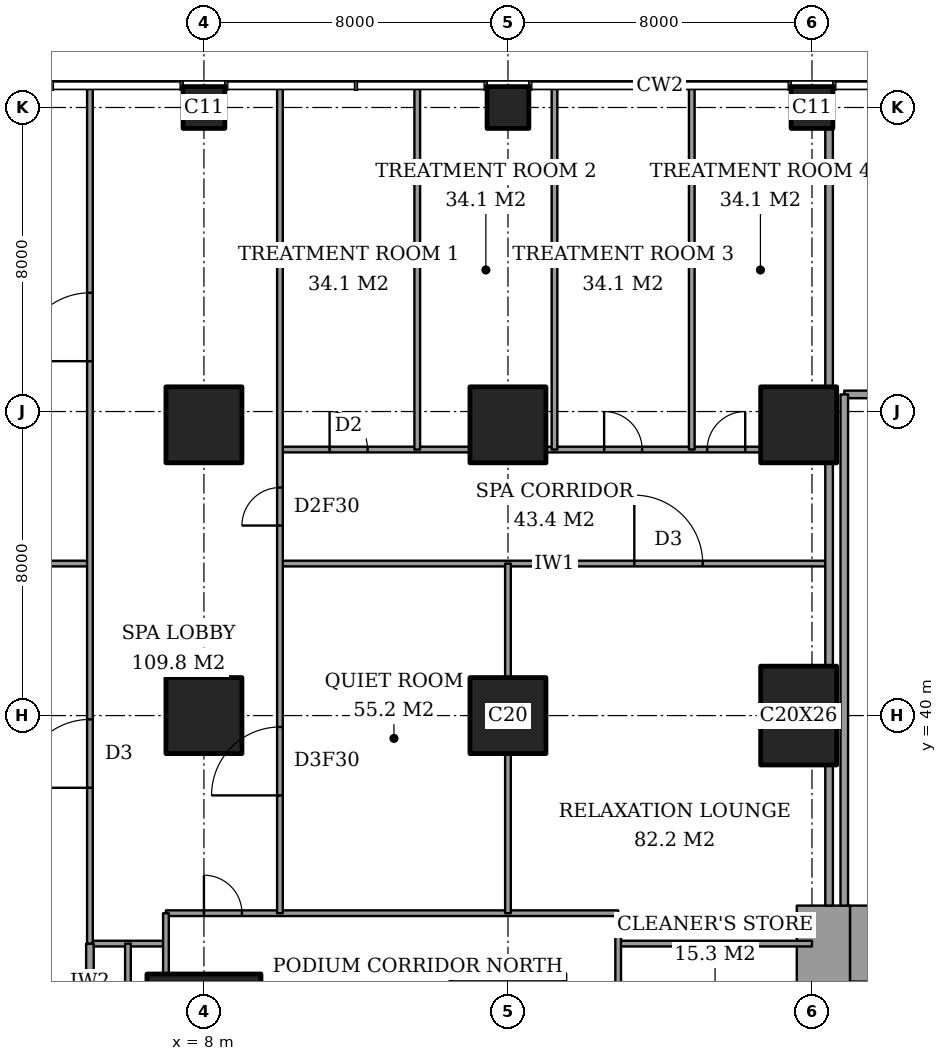
"""IFC4 building model, lengths in metres.
Left out: names, types, materials, properties, quantities, classifications, styles, units other than length and angle.
Written with IfcOpenShell. Run it as: python <this file> out.ifc"""

import sys

from ifc_helpers import new_model, si_unit, direction, frame, frame_2d, origin, origin_2d, place, context, subcontext, project, spatial, rectangle, extrude, element, fill, save


model = new_model("IFC4")
c1 = context("Model", 3, precision=1e-05, world=origin(), true_north=direction((0.0, 1.0)))
c2 = subcontext(c1, "Body", "Model", "MODEL_VIEW")
j1 = project(units=[si_unit("LENGTHUNIT", "METRE"), si_unit("PLANEANGLEUNIT", "RADIAN")], contexts=[c1])
p1 = place(None, origin())
s1 = spatial("IfcSite", under=j1, at=p1, CompositionType="ELEMENT")
p2 = place(p1, origin())
s2 = spatial("IfcBuilding", under=s1, at=p2, CompositionType="ELEMENT")
p3 = place(p2, frame((0.0, 0.0, 11.0)))
s3 = spatial("IfcBuildingStorey", under=s2, at=p3, CompositionType="ELEMENT", Elevation=11.0)
p4 = place(p3, frame((8.0, 32.0, 0.0), z_axis=(0.0, 0.0, 1.0), x_axis=(1.0, 0.0, 0.0)))
e1 = element("IfcColumn", 1, at=p4, inside=s3, PredefinedType="COLUMN", context=c2, shape_type="SweptSolid", body=[
    extrude(rectangle(XDim=3.0, YDim=2.4, at=origin_2d()), origin(), (0.0, 0.0, 1.0), 5.0),
])
for number, where, z_axis, x_axis in (
    (2, (8.0, 40.0, 0.0), (0.0, 0.0, 1.0), (1.0, 0.0, 0.0)),
    (3, (8.0, 47.65, 0.0), (0.0, 0.0, 1.0), (1.0, 0.0, 0.0)),
):
    element("IfcColumn", number, at=place(p3, frame(where, z_axis=z_axis, x_axis=x_axis)), inside=s3, PredefinedType="COLUMN", context=c2, shape_type="SweptSolid", body=[
        extrude(rectangle(XDim=2.0, YDim=2.0, at=origin_2d()), origin(), (0.0, 0.0, 1.0), 5.0),
    ])
p5 = place(p3, frame((8.0, 56.0, 0.0), z_axis=(0.0, 0.0, 1.0), x_axis=(1.0, 0.0, 0.0)))
e4 = element("IfcColumn", 4, at=p5, inside=s3, PredefinedType="COLUMN", context=c2, shape_type="SweptSolid", body=[
    extrude(rectangle(XDim=1.1, YDim=1.1, at=origin_2d()), origin(), (0.0, 0.0, 1.0), 5.0),
])
p6 = place(p3, frame((16.0, 32.0, 0.0), z_axis=(0.0, 0.0, 1.0), x_axis=(1.0, 0.0, 0.0)))
e5 = element("IfcColumn", 5, at=p6, inside=s3, PredefinedType="COLUMN", context=c2, shape_type="SweptSolid", body=[
    extrude(rectangle(XDim=3.0, YDim=2.4, at=origin_2d()), origin(), (0.0, 0.0, 1.0), 5.0),
])
for number, where, z_axis, x_axis in (
    (6, (16.0, 40.0, 0.0), (0.0, 0.0, 1.0), (1.0, 0.0, 0.0)),
    (7, (16.0, 47.65, 0.0), (0.0, 0.0, 1.0), (1.0, 0.0, 0.0)),
):
    element("IfcColumn", number, at=place(p3, frame(where, z_axis=z_axis, x_axis=x_axis)), inside=s3, PredefinedType="COLUMN", context=c2, shape_type="SweptSolid", body=[
        extrude(rectangle(XDim=2.0, YDim=2.0, at=origin_2d()), origin(), (0.0, 0.0, 1.0), 5.0),
    ])
p7 = place(p3, frame((16.0, 56.0, 0.0), z_axis=(0.0, 0.0, 1.0), x_axis=(1.0, 0.0, 0.0)))
e8 = element("IfcColumn", 8, at=p7, inside=s3, PredefinedType="COLUMN", context=c2, shape_type="SweptSolid", body=[
    extrude(rectangle(XDim=1.1, YDim=1.1, at=origin_2d()), origin(), (0.0, 0.0, 1.0), 5.0),
])
p8 = place(p3, frame((23.65, 40.0, 0.0), z_axis=(0.0, 0.0, 1.0), x_axis=(1.0, 0.0, 0.0)))
e9 = element("IfcColumn", 9, at=p8, inside=s3, PredefinedType="COLUMN", context=c2, shape_type="SweptSolid", body=[
    extrude(rectangle(XDim=2.0, YDim=2.6, at=origin_2d()), origin(), (0.0, 0.0, 1.0), 5.0),
])
p9 = place(p3, frame((23.65, 47.65, 0.0), z_axis=(0.0, 0.0, 1.0), x_axis=(1.0, 0.0, 0.0)))
e10 = element("IfcColumn", 10, at=p9, inside=s3, PredefinedType="COLUMN", context=c2, shape_type="SweptSolid", body=[
    extrude(rectangle(XDim=2.0, YDim=2.0, at=origin_2d()), origin(), (0.0, 0.0, 1.0), 5.0),
])
p10 = place(p3, frame((24.0, 56.0, 0.0), z_axis=(0.0, 0.0, 1.0), x_axis=(1.0, 0.0, 0.0)))
e11 = element("IfcColumn", 11, at=p10, inside=s3, PredefinedType="COLUMN", context=c2, shape_type="SweptSolid", body=[
    extrude(rectangle(XDim=1.1, YDim=1.1, at=origin_2d()), origin(), (0.0, 0.0, 1.0), 5.0),
])
p11 = place(p3, frame((25.0, 34.0, 0.0), z_axis=(0.0, 0.0, 1.0), x_axis=(1.0, 0.0, 0.0)))
e12 = element("IfcWall", 12, at=p11, inside=s3, PredefinedType="SHEAR", context=c2, shape_type="SweptSolid", body=[
    extrude(rectangle(XDim=3.15, YDim=2.0, at=frame_2d((1.575, 0.0))), origin(), (0.0, 0.0, 1.0), 5.0),
])
p12 = place(p3, frame((24.3, 23.15, 0.0), z_axis=(0.0, 0.0, 1.0), x_axis=(0.0, 1.0, 0.0)))
e13 = element("IfcWall", 13, at=p12, inside=s3, PredefinedType="SHEAR", context=c2, shape_type="SweptSolid", body=[
    extrude(rectangle(XDim=11.85, YDim=1.4, at=frame_2d((5.925, 0.0))), origin(), (0.0, 0.0, 1.0), 5.0),
])
p13 = place(p12, frame((0.75, 0.0, 0.0)))
e14 = element("IfcOpeningElement", 14, at=p13, cuts=e13, PredefinedType="OPENING", context=c2, shape_type="SweptSolid", body=[
    extrude(rectangle(XDim=1.8, YDim=2.4, at=frame_2d((0.9, 1.2))), frame((0.0, 0.71, 0.0), z_axis=(0.0, -1.0, 0.0), x_axis=(1.0, 0.0, 0.0)), (0.0, 0.0, 1.0), 1.42),
])
p14 = place(p3, frame((5.0, 34.0, 0.0), z_axis=(0.0, 0.0, 1.0), x_axis=(1.0, 0.0, 0.0)))
e15 = element("IfcWall", 15, at=p14, inside=s3, PredefinedType="PARTITIONING", context=c2, shape_type="SweptSolid", body=[
    extrude(rectangle(XDim=2.0, YDim=0.15, at=frame_2d((1.0, 0.0))), origin(), (0.0, 0.0, 1.0), 4.7),
])
p15 = place(p3, frame((18.9, 34.0, 0.0), z_axis=(0.0, 0.0, 1.0), x_axis=(1.0, 0.0, 0.0)))
e16 = element("IfcWall", 16, at=p15, inside=s3, PredefinedType="PARTITIONING", context=c2, shape_type="SweptSolid", body=[
    extrude(rectangle(XDim=5.1, YDim=0.15, at=frame_2d((2.55, 0.0))), origin(), (0.0, 0.0, 1.0), 4.7),
])
p16 = place(p3, frame((7.0, 34.8, 0.0), z_axis=(0.0, 0.0, 1.0), x_axis=(1.0, 0.0, 0.0)))
e17 = element("IfcWall", 17, at=p16, inside=s3, PredefinedType="PARTITIONING", context=c2, shape_type="SweptSolid", body=[
    extrude(rectangle(XDim=11.9, YDim=0.15, at=frame_2d((5.95, 0.0))), origin(), (0.0, 0.0, 1.0), 4.7),
])
p17 = place(p16, frame((1.0, 0.0, 0.0)))
e18 = element("IfcOpeningElement", 18, at=p17, cuts=e17, PredefinedType="OPENING", context=c2, shape_type="SweptSolid", body=[
    extrude(rectangle(XDim=1.0, YDim=2.1, at=frame_2d((0.5, 1.05))), frame((0.0, 0.085, 0.0), z_axis=(0.0, -1.0, 0.0), x_axis=(1.0, 0.0, 0.0)), (0.0, 0.0, 1.0), 0.17),
])
p18 = place(p3, frame((-8.45, 44.0, 0.0), z_axis=(0.0, 0.0, 1.0), x_axis=(1.0, 0.0, 0.0)))
e19 = element("IfcWall", 19, at=p18, inside=s3, PredefinedType="PARTITIONING", context=c2, shape_type="SweptSolid", body=[
    extrude(rectangle(XDim=13.45, YDim=0.15, at=frame_2d((6.725, 0.0))), origin(), (0.0, 0.0, 1.0), 4.7),
])
p19 = place(p3, frame((10.0, 44.0, 0.0), z_axis=(0.0, 0.0, 1.0), x_axis=(1.0, 0.0, 0.0)))
e20 = element("IfcWall", 20, at=p19, inside=s3, PredefinedType="PARTITIONING", context=c2, shape_type="SweptSolid", body=[
    extrude(rectangle(XDim=14.45, YDim=0.15, at=frame_2d((7.225, 0.0))), origin(), (0.0, 0.0, 1.0), 4.7),
])
p20 = place(p19, frame((9.325, 0.0, 0.0)))
e21 = element("IfcOpeningElement", 21, at=p20, cuts=e20, PredefinedType="OPENING", context=c2, shape_type="SweptSolid", body=[
    extrude(rectangle(XDim=1.8, YDim=2.1, at=frame_2d((0.9, 1.05))), frame((0.0, 0.085, 0.0), z_axis=(0.0, -1.0, 0.0), x_axis=(1.0, 0.0, 0.0)), (0.0, 0.0, 1.0), 0.17),
])
p21 = place(p3, frame((10.0, 47.0, 0.0), z_axis=(0.0, 0.0, 1.0), x_axis=(1.0, 0.0, 0.0)))
e22 = element("IfcWall", 22, at=p21, inside=s3, PredefinedType="PARTITIONING", context=c2, shape_type="SweptSolid", body=[
    extrude(rectangle(XDim=5.0, YDim=0.15, at=frame_2d((2.5, 0.0))), origin(), (0.0, 0.0, 1.0), 4.7),
])
p22 = place(p21, frame((1.306, 0.0, 0.0)))
e23 = element("IfcOpeningElement", 23, at=p22, cuts=e22, PredefinedType="OPENING", context=c2, shape_type="SweptSolid", body=[
    extrude(rectangle(XDim=1.0, YDim=2.1, at=frame_2d((0.5, 1.05))), frame((0.0, 0.085, 0.0), z_axis=(0.0, -1.0, 0.0), x_axis=(1.0, 0.0, 0.0)), (0.0, 0.0, 1.0), 0.17),
])
p23 = place(p3, frame((17.0, 47.0, 0.0), z_axis=(0.0, 0.0, 1.0), x_axis=(1.0, 0.0, 0.0)))
e24 = element("IfcWall", 24, at=p23, inside=s3, PredefinedType="PARTITIONING", context=c2, shape_type="SweptSolid", body=[
    extrude(rectangle(XDim=5.65, YDim=0.15, at=frame_2d((2.825, 0.0))), origin(), (0.0, 0.0, 1.0), 4.7),
])
p24 = place(p23, frame((1.531, 0.0, 0.0)))
e25 = element("IfcOpeningElement", 25, at=p24, cuts=e24, PredefinedType="OPENING", context=c2, shape_type="SweptSolid", body=[
    extrude(rectangle(XDim=1.0, YDim=2.1, at=frame_2d((0.5, 1.05))), frame((0.0, 0.085, 0.0), z_axis=(0.0, -1.0, 0.0), x_axis=(1.0, 0.0, 0.0)), (0.0, 0.0, 1.0), 0.17),
])
p25 = place(p23, frame((4.243, 0.0, 0.0)))
e26 = element("IfcOpeningElement", 26, at=p25, cuts=e24, PredefinedType="OPENING", context=c2, shape_type="SweptSolid", body=[
    extrude(rectangle(XDim=1.0, YDim=2.1, at=frame_2d((0.5, 1.05))), frame((0.0, 0.085, 0.0), z_axis=(0.0, -1.0, 0.0), x_axis=(1.0, 0.0, 0.0)), (0.0, 0.0, 1.0), 0.17),
])
p26 = place(p3, frame((24.85, 48.45, 0.0), z_axis=(0.0, 0.0, 1.0), x_axis=(1.0, 0.0, 0.0)))
e27 = element("IfcWall", 27, at=p26, inside=s3, PredefinedType="PARTITIONING", context=c2, shape_type="SweptSolid", body=[
    extrude(rectangle(XDim=7.6, YDim=0.2, at=frame_2d((3.8, 0.0))), origin(), (0.0, 0.0, 1.0), 4.7),
])
p27 = place(p3, frame((5.0, 32.0, 0.0), z_axis=(0.0, 0.0, 1.0), x_axis=(0.0, 1.0, 0.0)))
e28 = element("IfcWall", 28, at=p27, inside=s3, PredefinedType="PARTITIONING", context=c2, shape_type="SweptSolid", body=[
    extrude(rectangle(XDim=2.0, YDim=0.2, at=frame_2d((1.0, 0.0))), origin(), (0.0, 0.0, 1.0), 4.7),
])
p28 = place(p3, frame((5.0, 34.0, 0.0), z_axis=(0.0, 0.0, 1.0), x_axis=(0.0, 1.0, 0.0)))
e29 = element("IfcWall", 29, at=p28, inside=s3, PredefinedType="PARTITIONING", context=c2, shape_type="SweptSolid", body=[
    extrude(rectangle(XDim=22.561, YDim=0.15, at=frame_2d((11.281, 0.0))), origin(), (0.0, 0.0, 1.0), 4.7),
])
p29 = place(p28, frame((4.1, 0.0, 0.0)))
e30 = element("IfcOpeningElement", 30, at=p29, cuts=e29, PredefinedType="OPENING", context=c2, shape_type="SweptSolid", body=[
    extrude(rectangle(XDim=1.8, YDim=2.1, at=frame_2d((0.9, 1.05))), frame((0.0, 0.085, 0.0), z_axis=(0.0, -1.0, 0.0), x_axis=(1.0, 0.0, 0.0)), (0.0, 0.0, 1.0), 0.17),
])
p30 = place(p28, frame((15.325, 0.0, 0.0)))
e31 = element("IfcOpeningElement", 31, at=p30, cuts=e29, PredefinedType="OPENING", context=c2, shape_type="SweptSolid", body=[
    extrude(rectangle(XDim=1.8, YDim=2.1, at=frame_2d((0.9, 1.05))), frame((0.0, 0.085, 0.0), z_axis=(0.0, -1.0, 0.0), x_axis=(1.0, 0.0, 0.0)), (0.0, 0.0, 1.0), 0.17),
])
p31 = place(p3, frame((6.0, 32.0, 0.0), z_axis=(0.0, 0.0, 1.0), x_axis=(0.0, 1.0, 0.0)))
e32 = element("IfcWall", 32, at=p31, inside=s3, PredefinedType="PARTITIONING", context=c2, shape_type="SweptSolid", body=[
    extrude(rectangle(XDim=2.0, YDim=0.15, at=frame_2d((1.0, 0.0))), origin(), (0.0, 0.0, 1.0), 4.7),
])
p32 = place(p3, frame((7.0, 33.2, 0.0), z_axis=(0.0, 0.0, 1.0), x_axis=(0.0, 1.0, 0.0)))
e33 = element("IfcWall", 33, at=p32, inside=s3, PredefinedType="PARTITIONING", context=c2, shape_type="SweptSolid", body=[
    extrude(rectangle(XDim=1.6, YDim=0.15, at=frame_2d((0.8, 0.0))), origin(), (0.0, 0.0, 1.0), 4.7),
])
p33 = place(p3, frame((10.0, 34.8, 0.0), z_axis=(0.0, 0.0, 1.0), x_axis=(0.0, 1.0, 0.0)))
e34 = element("IfcWall", 34, at=p33, inside=s3, PredefinedType="PARTITIONING", context=c2, shape_type="SweptSolid", body=[
    extrude(rectangle(XDim=21.761, YDim=0.15, at=frame_2d((10.88, 0.0))), origin(), (0.0, 0.0, 1.0), 4.7),
])
p34 = place(p33, frame((10.2, 0.0, 0.0)))
e35 = element("IfcOpeningElement", 35, at=p34, cuts=e34, PredefinedType="OPENING", context=c2, shape_type="SweptSolid", body=[
    extrude(rectangle(XDim=1.0, YDim=2.1, at=frame_2d((0.5, 1.05))), frame((0.0, 0.085, 0.0), z_axis=(0.0, -1.0, 0.0), x_axis=(1.0, 0.0, 0.0)), (0.0, 0.0, 1.0), 0.17),
])
p35 = place(p33, frame((3.1, 0.0, 0.0)))
e36 = element("IfcOpeningElement", 36, at=p35, cuts=e34, PredefinedType="OPENING", context=c2, shape_type="SweptSolid", body=[
    extrude(rectangle(XDim=1.8, YDim=2.1, at=frame_2d((0.9, 1.05))), frame((0.0, 0.085, 0.0), z_axis=(0.0, -1.0, 0.0), x_axis=(1.0, 0.0, 0.0)), (0.0, 0.0, 1.0), 0.17),
])
p36 = place(p3, frame((13.613, 47.0, 0.0), z_axis=(0.0, 0.0, 1.0), x_axis=(0.0, 1.0, 0.0)))
e37 = element("IfcWall", 37, at=p36, inside=s3, PredefinedType="PARTITIONING", context=c2, shape_type="SweptSolid", body=[
    extrude(rectangle(XDim=9.561, YDim=0.15, at=frame_2d((4.781, 0.0))), origin(), (0.0, 0.0, 1.0), 4.7),
])
p37 = place(p3, frame((16.0, 34.8, 0.0), z_axis=(0.0, 0.0, 1.0), x_axis=(0.0, 1.0, 0.0)))
e38 = element("IfcWall", 38, at=p37, inside=s3, PredefinedType="PARTITIONING", context=c2, shape_type="SweptSolid", body=[
    extrude(rectangle(XDim=4.2, YDim=0.15, at=frame_2d((2.1, 0.0))), origin(), (0.0, 0.0, 1.0), 3.3),
])
p38 = place(p3, frame((16.0, 41.0, 0.0), z_axis=(0.0, 0.0, 1.0), x_axis=(0.0, 1.0, 0.0)))
e39 = element("IfcWall", 39, at=p38, inside=s3, PredefinedType="PARTITIONING", context=c2, shape_type="SweptSolid", body=[
    extrude(rectangle(XDim=3.0, YDim=0.15, at=frame_2d((1.5, 0.0))), origin(), (0.0, 0.0, 1.0), 3.3),
])
p39 = place(p3, frame((17.225, 47.0, 0.0), z_axis=(0.0, 0.0, 1.0), x_axis=(0.0, 1.0, 0.0)))
e40 = element("IfcWall", 40, at=p39, inside=s3, PredefinedType="PARTITIONING", context=c2, shape_type="SweptSolid", body=[
    extrude(rectangle(XDim=9.561, YDim=0.15, at=frame_2d((4.781, 0.0))), origin(), (0.0, 0.0, 1.0), 4.7),
])
p40 = place(p3, frame((18.9, 31.0, 0.0), z_axis=(0.0, 0.0, 1.0), x_axis=(0.0, 1.0, 0.0)))
e41 = element("IfcWall", 41, at=p40, inside=s3, PredefinedType="PARTITIONING", context=c2, shape_type="SweptSolid", body=[
    extrude(rectangle(XDim=3.8, YDim=0.15, at=frame_2d((1.9, 0.0))), origin(), (0.0, 0.0, 1.0), 4.7),
])
p41 = place(p40, frame((1.05, 0.0, 0.0)))
e42 = element("IfcOpeningElement", 42, at=p41, cuts=e41, PredefinedType="OPENING", context=c2, shape_type="SweptSolid", body=[
    extrude(rectangle(XDim=0.9, YDim=2.1, at=frame_2d((0.45, 1.05))), frame((0.0, 0.085, 0.0), z_axis=(0.0, -1.0, 0.0), x_axis=(1.0, 0.0, 0.0)), (0.0, 0.0, 1.0), 0.17),
])
p42 = place(p3, frame((20.837, 47.0, 0.0), z_axis=(0.0, 0.0, 1.0), x_axis=(0.0, 1.0, 0.0)))
e43 = element("IfcWall", 43, at=p42, inside=s3, PredefinedType="PARTITIONING", context=c2, shape_type="SweptSolid", body=[
    extrude(rectangle(XDim=9.561, YDim=0.15, at=frame_2d((4.781, 0.0))), origin(), (0.0, 0.0, 1.0), 4.7),
])
p43 = place(p3, frame((24.45, 35.0, 0.0), z_axis=(0.0, 0.0, 1.0), x_axis=(0.0, 1.0, 0.0)))
e44 = element("IfcWall", 44, at=p43, inside=s3, PredefinedType="PARTITIONING", context=c2, shape_type="SweptSolid", body=[
    extrude(rectangle(XDim=3.7, YDim=0.2, at=frame_2d((1.85, 0.0))), origin(), (0.0, 0.0, 1.0), 4.7),
])
p44 = place(p3, frame((24.45, 41.3, 0.0), z_axis=(0.0, 0.0, 1.0), x_axis=(0.0, 1.0, 0.0)))
e45 = element("IfcWall", 45, at=p44, inside=s3, PredefinedType="PARTITIONING", context=c2, shape_type="SweptSolid", body=[
    extrude(rectangle(XDim=5.35, YDim=0.2, at=frame_2d((2.675, 0.0))), origin(), (0.0, 0.0, 1.0), 4.7),
])
p45 = place(p3, frame((24.45, 48.65, 0.0), z_axis=(0.0, 0.0, 1.0), x_axis=(0.0, 1.0, 0.0)))
e46 = element("IfcWall", 46, at=p45, inside=s3, PredefinedType="PARTITIONING", context=c2, shape_type="SweptSolid", body=[
    extrude(rectangle(XDim=6.8, YDim=0.2, at=frame_2d((3.4, 0.0))), origin(), (0.0, 0.0, 1.0), 4.7),
])
p46 = place(p3, frame((24.85, 35.0, 0.0), z_axis=(0.0, 0.0, 1.0), x_axis=(0.0, 1.0, 0.0)))
e47 = element("IfcWall", 47, at=p46, inside=s3, PredefinedType="PARTITIONING", context=c2, shape_type="SweptSolid", body=[
    extrude(rectangle(XDim=13.45, YDim=0.2, at=frame_2d((6.725, 0.0))), origin(), (0.0, 0.0, 1.0), 4.7),
])
p47 = place(p17, origin())
e48 = element("IfcDoor", 48, at=p47, inside=s3, OperationType="SINGLE_SWING_RIGHT", PredefinedType="DOOR", context=c2, shape_type="SweptSolid", body=[
    extrude(rectangle(XDim=1.0, YDim=2.1, at=frame_2d((0.5, 1.05))), frame((0.0, 0.025, 0.0), z_axis=(0.0, -1.0, 0.0), x_axis=(1.0, 0.0, 0.0)), (0.0, 0.0, 1.0), 0.05),
])
fill(e18, e48)
p48 = place(p34, origin())
e49 = element("IfcDoor", 49, at=p48, inside=s3, OperationType="SINGLE_SWING_RIGHT", PredefinedType="DOOR", context=c2, shape_type="SweptSolid", body=[
    extrude(rectangle(XDim=1.0, YDim=2.1, at=frame_2d((0.5, 1.05))), frame((0.0, 0.025, 0.0), z_axis=(0.0, -1.0, 0.0), x_axis=(1.0, 0.0, 0.0)), (0.0, 0.0, 1.0), 0.05),
])
fill(e35, e49)
p49 = place(p20, origin())
e50 = element("IfcDoor", 50, at=p49, inside=s3, OperationType="DOUBLE_DOOR_DOUBLE_SWING", PredefinedType="DOOR", context=c2, shape_type="SweptSolid", body=[
    extrude(rectangle(XDim=1.8, YDim=2.1, at=frame_2d((0.9, 1.05))), frame((0.0, 0.025, 0.0), z_axis=(0.0, -1.0, 0.0), x_axis=(1.0, 0.0, 0.0)), (0.0, 0.0, 1.0), 0.05),
])
fill(e21, e50)
p50 = place(p35, origin())
e51 = element("IfcDoor", 51, at=p50, inside=s3, OperationType="DOUBLE_DOOR_DOUBLE_SWING", PredefinedType="DOOR", context=c2, shape_type="SweptSolid", body=[
    extrude(rectangle(XDim=1.8, YDim=2.1, at=frame_2d((0.9, 1.05))), frame((0.0, 0.025, 0.0), z_axis=(0.0, -1.0, 0.0), x_axis=(1.0, 0.0, 0.0)), (0.0, 0.0, 1.0), 0.05),
])
fill(e36, e51)
p51 = place(p29, origin())
e52 = element("IfcDoor", 52, at=p51, inside=s3, OperationType="DOUBLE_DOOR_DOUBLE_SWING", PredefinedType="DOOR", context=c2, shape_type="SweptSolid", body=[
    extrude(rectangle(XDim=1.8, YDim=2.1, at=frame_2d((0.9, 1.05))), frame((0.0, 0.025, 0.0), z_axis=(0.0, -1.0, 0.0), x_axis=(1.0, 0.0, 0.0)), (0.0, 0.0, 1.0), 0.05),
])
fill(e30, e52)
p52 = place(p30, origin())
e53 = element("IfcDoor", 53, at=p52, inside=s3, OperationType="DOUBLE_DOOR_DOUBLE_SWING", PredefinedType="DOOR", context=c2, shape_type="SweptSolid", body=[
    extrude(rectangle(XDim=1.8, YDim=2.1, at=frame_2d((0.9, 1.05))), frame((0.0, 0.025, 0.0), z_axis=(0.0, -1.0, 0.0), x_axis=(1.0, 0.0, 0.0)), (0.0, 0.0, 1.0), 0.05),
])
fill(e31, e53)
p53 = place(p22, origin())
e54 = element("IfcDoor", 54, at=p53, inside=s3, OperationType="SINGLE_SWING_RIGHT", PredefinedType="DOOR", context=c2, shape_type="SweptSolid", body=[
    extrude(rectangle(XDim=1.0, YDim=2.1, at=frame_2d((0.5, 1.05))), frame((0.0, 0.025, 0.0), z_axis=(0.0, -1.0, 0.0), x_axis=(1.0, 0.0, 0.0)), (0.0, 0.0, 1.0), 0.05),
])
fill(e23, e54)
p54 = place(p24, origin())
e55 = element("IfcDoor", 55, at=p54, inside=s3, OperationType="SINGLE_SWING_RIGHT", PredefinedType="DOOR", context=c2, shape_type="SweptSolid", body=[
    extrude(rectangle(XDim=1.0, YDim=2.1, at=frame_2d((0.5, 1.05))), frame((0.0, 0.025, 0.0), z_axis=(0.0, -1.0, 0.0), x_axis=(1.0, 0.0, 0.0)), (0.0, 0.0, 1.0), 0.05),
])
fill(e25, e55)
p55 = place(p25, origin())
e56 = element("IfcDoor", 56, at=p55, inside=s3, OperationType="SINGLE_SWING_LEFT", PredefinedType="DOOR", context=c2, shape_type="SweptSolid", body=[
    extrude(rectangle(XDim=1.0, YDim=2.1, at=frame_2d((0.5, 1.05))), frame((0.0, 0.025, 0.0), z_axis=(0.0, -1.0, 0.0), x_axis=(1.0, 0.0, 0.0)), (0.0, 0.0, 1.0), 0.05),
])
fill(e26, e56)
save(model, sys.argv[1])
